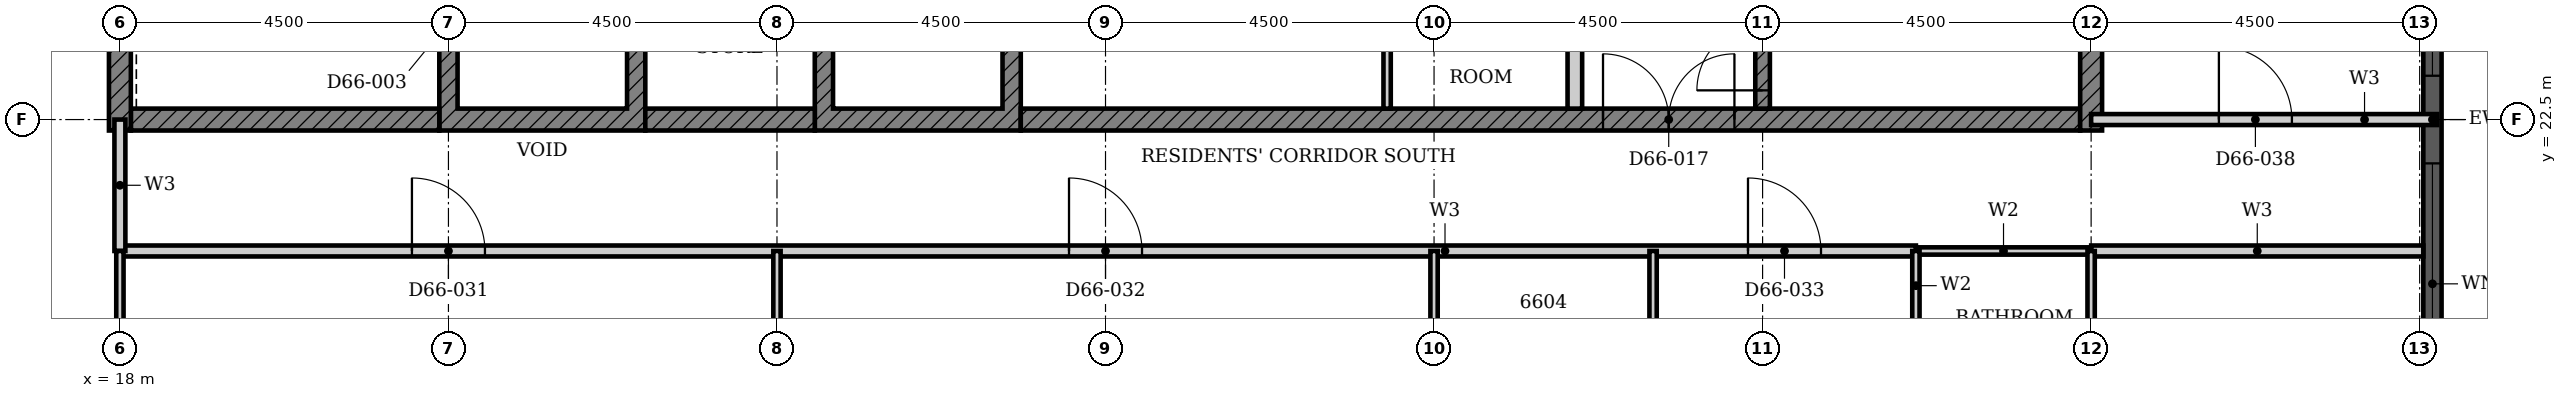
"""IFC4 building model, lengths in metres.
Left out: names, types, materials, properties, quantities, classifications, styles, units other than length and angle.
Written with IfcOpenShell. Run it as: python <this file> out.ifc"""

import sys

from ifc_helpers import new_model, si_unit, direction, frame, frame_2d, origin, place, context, subcontext, project, spatial, polyline, rectangle, outline, extrude, element, fill, save


model = new_model("IFC4")
c1 = context("Model", 3, precision=1e-05, world=origin(), true_north=direction((0.0, 1.0)))
c2 = subcontext(c1, "Body", "Model", "MODEL_VIEW")
j1 = project(units=[si_unit("LENGTHUNIT", "METRE"), si_unit("PLANEANGLEUNIT", "RADIAN")], contexts=[c1])
p1 = place(None, origin())
s1 = spatial("IfcSite", under=j1, at=p1, CompositionType="ELEMENT")
p2 = place(p1, origin())
s2 = spatial("IfcBuilding", under=s1, at=p2, CompositionType="ELEMENT")
p3 = place(p2, frame((0.0, 0.0, 260.1)))
s3 = spatial("IfcBuildingStorey", under=s2, at=p3, CompositionType="ELEMENT", Elevation=260.1)
p4 = place(p3, frame((49.675, 18.3, 0.0), z_axis=(0.0, 0.0, 1.0), x_axis=(0.0, 1.0, 0.0)))
e1 = element("IfcWall", 1, at=p4, inside=s3, PredefinedType="SOLIDWALL", context=c2, shape_type="SweptSolid", body=[
    extrude(rectangle(XDim=8.4, YDim=0.25, at=frame_2d((4.2, 0.0))), origin(), (0.0, 0.0, 1.0), 3.7),
])
p5 = place(p4, frame((0.3, 0.0, 0.45)))
e2 = element("IfcOpeningElement", 2, at=p5, cuts=e1, PredefinedType="OPENING", context=c2, shape_type="SweptSolid", body=[
    extrude(rectangle(XDim=3.3, YDim=2.3, at=frame_2d((1.65, 1.15))), frame((0.0, 0.135, 0.0), z_axis=(0.0, -1.0, 0.0), x_axis=(1.0, 0.0, 0.0)), (0.0, 0.0, 1.0), 0.27),
])
p6 = place(p4, frame((4.8, 0.0, 0.45)))
e3 = element("IfcOpeningElement", 3, at=p6, cuts=e1, PredefinedType="OPENING", context=c2, shape_type="SweptSolid", body=[
    extrude(rectangle(XDim=3.3, YDim=2.3, at=frame_2d((1.65, 1.15))), frame((0.0, 0.135, 0.0), z_axis=(0.0, -1.0, 0.0), x_axis=(1.0, 0.0, 0.0)), (0.0, 0.0, 1.0), 0.27),
])
p7 = place(p3, origin())
e4 = element("IfcWall", 4, at=p7, inside=s3, PredefinedType="SHEAR", context=c2, shape_type="SweptSolid", body=[
    extrude(outline(polyline([(22.375, 22.35), (25.197, 22.35), (25.197, 25.275), (24.947, 25.275), (24.947, 22.65), (22.625, 22.65), (22.625, 25.275), (22.375, 25.275), (22.375, 22.35)])), origin(), (0.0, 0.0, 1.0), 3.4),
])
p8 = place(p3, origin())
e5 = element("IfcWall", 5, at=p8, inside=s3, PredefinedType="SHEAR", context=c2, shape_type="SweptSolid", body=[
    extrude(outline(polyline([(27.518, 22.35), (30.339, 22.35), (30.339, 25.275), (30.089, 25.275), (30.089, 22.65), (27.768, 22.65), (27.768, 25.275), (27.518, 25.275), (27.518, 22.35)])), origin(), (0.0, 0.0, 1.0), 3.4),
])
p9 = place(p3, frame((18.15, 22.5, 0.0), z_axis=(0.0, 0.0, 1.0), x_axis=(1.0, 0.0, 0.0)))
e6 = element("IfcWall", 6, at=p9, inside=s3, PredefinedType="SHEAR", context=c2, shape_type="SweptSolid", body=[
    extrude(rectangle(XDim=4.225, YDim=0.3, at=frame_2d((2.113, 0.0))), origin(), (0.0, 0.0, 1.0), 3.4),
])
p10 = place(p3, frame((25.197, 22.5, 0.0), z_axis=(0.0, 0.0, 1.0), x_axis=(1.0, 0.0, 0.0)))
e7 = element("IfcWall", 7, at=p10, inside=s3, PredefinedType="SHEAR", context=c2, shape_type="SweptSolid", body=[
    extrude(rectangle(XDim=2.321, YDim=0.3, at=frame_2d((1.161, 0.0))), origin(), (0.0, 0.0, 1.0), 3.4),
])
p11 = place(p3, frame((30.339, 22.5, 0.0), z_axis=(0.0, 0.0, 1.0), x_axis=(1.0, 0.0, 0.0)))
e8 = element("IfcWall", 8, at=p11, inside=s3, PredefinedType="SHEAR", context=c2, shape_type="SweptSolid", body=[
    extrude(rectangle(XDim=14.511, YDim=0.3, at=frame_2d((7.255, 0.0))), origin(), (0.0, 0.0, 1.0), 3.4),
])
p12 = place(p11, frame((7.975, 0.0, 0.0)))
e9 = element("IfcOpeningElement", 9, at=p12, cuts=e8, PredefinedType="OPENING", context=c2, shape_type="SweptSolid", body=[
    extrude(rectangle(XDim=1.8, YDim=2.1, at=frame_2d((0.9, 1.05))), frame((0.0, 0.16, 0.0), z_axis=(0.0, -1.0, 0.0), x_axis=(1.0, 0.0, 0.0)), (0.0, 0.0, 1.0), 0.32),
])
for number, where, z_axis, x_axis in (
    (10, (18.0, 22.35, 0.0), (0.0, 0.0, 1.0), (0.0, 1.0, 0.0)),
    (11, (45.0, 22.35, 0.0), (0.0, 0.0, 1.0), (0.0, 1.0, 0.0)),
):
    element("IfcWall", number, at=place(p3, frame(where, z_axis=z_axis, x_axis=x_axis)), inside=s3, PredefinedType="SHEAR", context=c2, shape_type="SweptSolid", body=[
        extrude(rectangle(XDim=9.3, YDim=0.3, at=frame_2d((4.65, 0.0))), origin(), (0.0, 0.0, 1.0), 3.4),
    ])
p13 = place(p3, frame((37.928, 22.65, 0.0), z_axis=(0.0, 0.0, 1.0), x_axis=(0.0, 1.0, 0.0)))
e12 = element("IfcWall", 12, at=p13, inside=s3, PredefinedType="PARTITIONING", context=c2, shape_type="SweptSolid", body=[
    extrude(rectangle(XDim=2.625, YDim=0.2, at=frame_2d((1.312, 0.0))), origin(), (0.0, 0.0, 1.0), 3.4),
])
p14 = place(p3, frame((35.357, 22.65, 0.0), z_axis=(0.0, 0.0, 1.0), x_axis=(0.0, 1.0, 0.0)))
e13 = element("IfcWall", 13, at=p14, inside=s3, PredefinedType="PARTITIONING", context=c2, shape_type="SweptSolid", body=[
    extrude(rectangle(XDim=2.625, YDim=0.1, at=frame_2d((1.312, 0.0))), origin(), (0.0, 0.0, 1.0), 3.4),
])
p15 = place(p3, frame((40.5, 22.65, 0.0), z_axis=(0.0, 0.0, 1.0), x_axis=(0.0, 1.0, 0.0)))
e14 = element("IfcWall", 14, at=p15, inside=s3, PredefinedType="SHEAR", context=c2, shape_type="SweptSolid", body=[
    extrude(rectangle(XDim=5.825, YDim=0.2, at=frame_2d((2.913, 0.0))), origin(), (0.0, 0.0, 1.0), 3.4),
])
p16 = place(p15, frame((0.25, 0.0, 0.0)))
e15 = element("IfcOpeningElement", 15, at=p16, cuts=e14, PredefinedType="OPENING", context=c2, shape_type="SweptSolid", body=[
    extrude(rectangle(XDim=1.8, YDim=2.1, at=frame_2d((0.9, 1.05))), frame((0.0, 0.11, 0.0), z_axis=(0.0, -1.0, 0.0), x_axis=(1.0, 0.0, 0.0)), (0.0, 0.0, 1.0), 0.22),
])
p17 = place(p3, frame((18.0, 20.7, 0.0), z_axis=(0.0, 0.0, 1.0), x_axis=(1.0, 0.0, 0.0)))
e16 = element("IfcWall", 16, at=p17, inside=s3, PredefinedType="PARTITIONING", context=c2, shape_type="SweptSolid", body=[
    extrude(rectangle(XDim=24.6, YDim=0.15, at=frame_2d((12.3, 0.0))), origin(), (0.0, 0.0, 1.0), 3.4),
])
p18 = place(p17, frame((4.0, 0.0, 0.0)))
e17 = element("IfcOpeningElement", 17, at=p18, cuts=e16, PredefinedType="OPENING", context=c2, shape_type="SweptSolid", body=[
    extrude(rectangle(XDim=1.0, YDim=2.1, at=frame_2d((0.5, 1.05))), frame((0.0, 0.085, 0.0), z_axis=(0.0, -1.0, 0.0), x_axis=(1.0, 0.0, 0.0)), (0.0, 0.0, 1.0), 0.17),
])
p19 = place(p17, frame((13.0, 0.0, 0.0)))
e18 = element("IfcOpeningElement", 18, at=p19, cuts=e16, PredefinedType="OPENING", context=c2, shape_type="SweptSolid", body=[
    extrude(rectangle(XDim=1.0, YDim=2.1, at=frame_2d((0.5, 1.05))), frame((0.0, 0.085, 0.0), z_axis=(0.0, -1.0, 0.0), x_axis=(1.0, 0.0, 0.0)), (0.0, 0.0, 1.0), 0.17),
])
p20 = place(p17, frame((22.3, 0.0, 0.0)))
e19 = element("IfcOpeningElement", 19, at=p20, cuts=e16, PredefinedType="OPENING", context=c2, shape_type="SweptSolid", body=[
    extrude(rectangle(XDim=1.0, YDim=2.2, at=frame_2d((0.5, 1.1))), frame((0.0, 0.085, 0.0), z_axis=(0.0, -1.0, 0.0), x_axis=(1.0, 0.0, 0.0)), (0.0, 0.0, 1.0), 0.17),
])
p21 = place(p3, frame((45.001, 20.7, 0.0), z_axis=(0.0, 0.0, 1.0), x_axis=(1.0, 0.0, 0.0)))
e20 = element("IfcWall", 20, at=p21, inside=s3, PredefinedType="PARTITIONING", context=c2, shape_type="SweptSolid", body=[
    extrude(rectangle(XDim=4.549, YDim=0.15, at=frame_2d((2.274, 0.0))), origin(), (0.0, 0.0, 1.0), 3.4),
])
p22 = place(p3, frame((45.0, 22.5, 0.0), z_axis=(0.0, 0.0, 1.0), x_axis=(1.0, 0.0, 0.0)))
e21 = element("IfcWall", 21, at=p22, inside=s3, PredefinedType="PARTITIONING", context=c2, shape_type="SweptSolid", body=[
    extrude(rectangle(XDim=4.74, YDim=0.15, at=frame_2d((2.37, 0.0))), origin(), (0.0, 0.0, 1.0), 3.4),
])
p23 = place(p22, frame((1.75, 0.0, 0.0)))
e22 = element("IfcOpeningElement", 22, at=p23, cuts=e21, PredefinedType="OPENING", context=c2, shape_type="SweptSolid", body=[
    extrude(rectangle(XDim=1.0, YDim=2.1, at=frame_2d((0.5, 1.05))), frame((0.0, 0.085, 0.0), z_axis=(0.0, -1.0, 0.0), x_axis=(1.0, 0.0, 0.0)), (0.0, 0.0, 1.0), 0.17),
])
p24 = place(p3, frame((18.0, 20.7, 0.0), z_axis=(0.0, 0.0, 1.0), x_axis=(0.0, 1.0, 0.0)))
e23 = element("IfcWall", 23, at=p24, inside=s3, PredefinedType="PARTITIONING", context=c2, shape_type="SweptSolid", body=[
    extrude(rectangle(XDim=1.8, YDim=0.15, at=frame_2d((0.9, 0.0))), origin(), (0.0, 0.0, 1.0), 3.4),
])
p25 = place(p3, frame((18.0, 18.0, 0.0), z_axis=(0.0, 0.0, 1.0), x_axis=(0.0, 1.0, 0.0)))
e24 = element("IfcWall", 24, at=p25, inside=s3, PredefinedType="PARTITIONING", context=c2, shape_type="SweptSolid", body=[
    extrude(rectangle(XDim=2.7, YDim=0.1, at=frame_2d((1.35, 0.0))), origin(), (0.0, 0.0, 1.0), 3.4),
])
for number, where, z_axis, x_axis in (
    (25, (27.0, 13.31, 0.0), (0.0, 0.0, 1.0), (0.0, 1.0, 0.0)),
    (26, (36.0, 13.31, 0.0), (0.0, 0.0, 1.0), (0.0, 1.0, 0.0)),
):
    element("IfcWall", number, at=place(p3, frame(where, z_axis=z_axis, x_axis=x_axis)), inside=s3, PredefinedType="PARTITIONING", context=c2, shape_type="SweptSolid", body=[
        extrude(rectangle(XDim=7.39, YDim=0.1, at=frame_2d((3.695, 0.0))), origin(), (0.0, 0.0, 1.0), 3.4),
    ])
p26 = place(p3, frame((39.0, 18.0, 0.0), z_axis=(0.0, 0.0, 1.0), x_axis=(0.0, 1.0, 0.0)))
e27 = element("IfcWall", 27, at=p26, inside=s3, PredefinedType="PARTITIONING", context=c2, shape_type="SweptSolid", body=[
    extrude(rectangle(XDim=2.7, YDim=0.1, at=frame_2d((1.35, 0.0))), origin(), (0.0, 0.0, 1.0), 3.4),
])
p27 = place(p3, frame((42.6, 20.7, 0.0), z_axis=(0.0, 0.0, 1.0), x_axis=(1.0, 0.0, 0.0)))
e28 = element("IfcWall", 28, at=p27, inside=s3, PredefinedType="PARTITIONING", context=c2, shape_type="SweptSolid", body=[
    extrude(rectangle(XDim=2.4, YDim=0.1, at=frame_2d((1.2, 0.0))), origin(), (0.0, 0.0, 1.0), 3.4),
])
p28 = place(p3, frame((42.6, 18.0, 0.0), z_axis=(0.0, 0.0, 1.0), x_axis=(0.0, 1.0, 0.0)))
e29 = element("IfcWall", 29, at=p28, inside=s3, PredefinedType="PARTITIONING", context=c2, shape_type="SweptSolid", body=[
    extrude(rectangle(XDim=2.7, YDim=0.1, at=frame_2d((1.35, 0.0))), origin(), (0.0, 0.0, 1.0), 3.4),
])
p29 = place(p28, frame((0.95, 0.0, 0.0)))
e30 = element("IfcOpeningElement", 30, at=p29, cuts=e29, PredefinedType="OPENING", context=c2, shape_type="SweptSolid", body=[
    extrude(rectangle(XDim=0.8, YDim=2.1, at=frame_2d((0.4, 1.05))), frame((0.0, 0.06, 0.0), z_axis=(0.0, -1.0, 0.0), x_axis=(1.0, 0.0, 0.0)), (0.0, 0.0, 1.0), 0.12),
])
p30 = place(p3, frame((45.0, 18.0, 0.0), z_axis=(0.0, 0.0, 1.0), x_axis=(0.0, 1.0, 0.0)))
e31 = element("IfcWall", 31, at=p30, inside=s3, PredefinedType="PARTITIONING", context=c2, shape_type="SweptSolid", body=[
    extrude(rectangle(XDim=2.699, YDim=0.1, at=frame_2d((1.35, 0.0))), origin(), (0.0, 0.0, 1.0), 3.4),
])
p31 = place(p5, origin())
e32 = element("IfcWindow", 32, at=p31, inside=s3, PartitioningType="SINGLE_PANEL", PredefinedType="WINDOW", context=c2, shape_type="SweptSolid", body=[
    extrude(rectangle(XDim=3.3, YDim=2.3, at=frame_2d((1.65, 1.15))), frame((0.0, 0.03, 0.0), z_axis=(0.0, -1.0, 0.0), x_axis=(1.0, 0.0, 0.0)), (0.0, 0.0, 1.0), 0.06),
])
fill(e2, e32)
p32 = place(p6, origin())
e33 = element("IfcWindow", 33, at=p32, inside=s3, PartitioningType="SINGLE_PANEL", PredefinedType="WINDOW", context=c2, shape_type="SweptSolid", body=[
    extrude(rectangle(XDim=3.3, YDim=2.3, at=frame_2d((1.65, 1.15))), frame((0.0, 0.03, 0.0), z_axis=(0.0, -1.0, 0.0), x_axis=(1.0, 0.0, 0.0)), (0.0, 0.0, 1.0), 0.06),
])
fill(e3, e33)
p33 = place(p16, origin())
e34 = element("IfcDoor", 34, at=p33, inside=s3, OperationType="DOUBLE_DOOR_SINGLE_SWING", PredefinedType="DOOR", context=c2, shape_type="SweptSolid", body=[
    extrude(rectangle(XDim=1.8, YDim=2.1, at=frame_2d((0.9, 1.05))), frame((0.0, 0.025, 0.0), z_axis=(0.0, -1.0, 0.0), x_axis=(1.0, 0.0, 0.0)), (0.0, 0.0, 1.0), 0.05),
])
fill(e15, e34)
p34 = place(p12, origin())
e35 = element("IfcDoor", 35, at=p34, inside=s3, OperationType="DOUBLE_DOOR_SINGLE_SWING", PredefinedType="DOOR", context=c2, shape_type="SweptSolid", body=[
    extrude(rectangle(XDim=1.8, YDim=2.1, at=frame_2d((0.9, 1.05))), frame((0.0, 0.025, 0.0), z_axis=(0.0, -1.0, 0.0), x_axis=(1.0, 0.0, 0.0)), (0.0, 0.0, 1.0), 0.05),
])
fill(e9, e35)
p35 = place(p18, origin())
e36 = element("IfcDoor", 36, at=p35, inside=s3, OperationType="SINGLE_SWING_LEFT", PredefinedType="DOOR", context=c2, shape_type="SweptSolid", body=[
    extrude(rectangle(XDim=1.0, YDim=2.1, at=frame_2d((0.5, 1.05))), frame((0.0, 0.025, 0.0), z_axis=(0.0, -1.0, 0.0), x_axis=(1.0, 0.0, 0.0)), (0.0, 0.0, 1.0), 0.05),
])
fill(e17, e36)
p36 = place(p19, origin())
e37 = element("IfcDoor", 37, at=p36, inside=s3, OperationType="SINGLE_SWING_LEFT", PredefinedType="DOOR", context=c2, shape_type="SweptSolid", body=[
    extrude(rectangle(XDim=1.0, YDim=2.1, at=frame_2d((0.5, 1.05))), frame((0.0, 0.025, 0.0), z_axis=(0.0, -1.0, 0.0), x_axis=(1.0, 0.0, 0.0)), (0.0, 0.0, 1.0), 0.05),
])
fill(e18, e37)
p37 = place(p20, origin())
e38 = element("IfcDoor", 38, at=p37, inside=s3, OperationType="SINGLE_SWING_LEFT", PredefinedType="DOOR", context=c2, shape_type="SweptSolid", body=[
    extrude(rectangle(XDim=1.0, YDim=2.2, at=frame_2d((0.5, 1.1))), frame((0.0, 0.025, 0.0), z_axis=(0.0, -1.0, 0.0), x_axis=(1.0, 0.0, 0.0)), (0.0, 0.0, 1.0), 0.05),
])
fill(e19, e38)
p38 = place(p23, origin())
e39 = element("IfcDoor", 39, at=p38, inside=s3, OperationType="SINGLE_SWING_LEFT", PredefinedType="DOOR", context=c2, shape_type="SweptSolid", body=[
    extrude(rectangle(XDim=1.0, YDim=2.1, at=frame_2d((0.5, 1.05))), frame((0.0, 0.025, 0.0), z_axis=(0.0, -1.0, 0.0), x_axis=(1.0, 0.0, 0.0)), (0.0, 0.0, 1.0), 0.05),
])
fill(e22, e39)
save(model, sys.argv[1])
